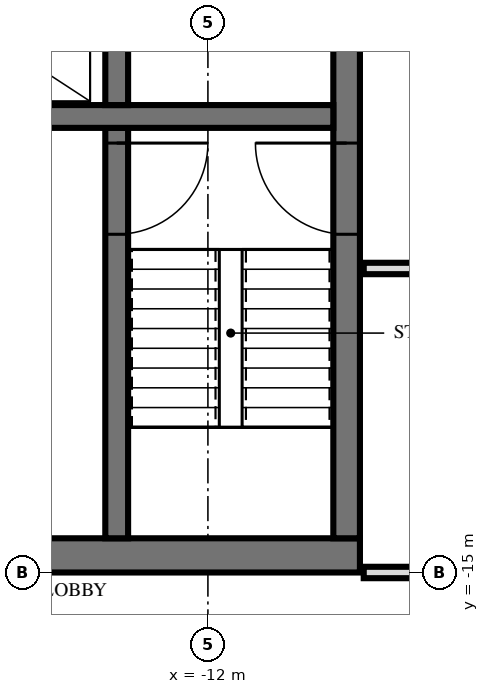
"""IFC4 building model, lengths in metres.
Left out: names, types, materials, properties, quantities, classifications, styles, units other than length and angle.
Written with IfcOpenShell. Run it as: python <this file> out.ifc"""

import sys

from ifc_helpers import new_model, si_unit, direction, frame, frame_2d, origin, place, context, subcontext, project, spatial, rectangle, extrude, element, fill, save


model = new_model("IFC4")
c1 = context("Model", 3, precision=1e-05, world=origin(), true_north=direction((0.0, 1.0)))
c2 = subcontext(c1, "Body", "Model", "MODEL_VIEW")
j1 = project(units=[si_unit("LENGTHUNIT", "METRE"), si_unit("PLANEANGLEUNIT", "RADIAN")], contexts=[c1])
p1 = place(None, origin())
s1 = spatial("IfcSite", under=j1, at=p1, CompositionType="ELEMENT")
p2 = place(p1, origin())
s2 = spatial("IfcBuilding", under=s1, at=p2, CompositionType="ELEMENT")
p3 = place(p2, frame((0.0, 0.0, 85.2)))
s3 = spatial("IfcBuildingStorey", under=s2, at=p3, CompositionType="ELEMENT", Elevation=85.2)
p4 = place(p3, frame((-29.5, -14.775, 0.0), z_axis=(0.0, 0.0, 1.0), x_axis=(1.0, 0.0, 0.0)))
e1 = element("IfcWall", 1, at=p4, inside=s3, PredefinedType="SHEAR", context=c2, shape_type="SweptSolid", body=[
    extrude(rectangle(XDim=19.5, YDim=0.45, at=frame_2d((9.75, 0.0))), origin(), (0.0, 0.0, 1.0), 3.6),
])
p5 = place(p4, frame((11.2, 0.0, 0.0)))
e2 = element("IfcOpeningElement", 2, at=p5, cuts=e1, PredefinedType="OPENING", context=c2, shape_type="SweptSolid", body=[
    extrude(rectangle(XDim=1.2, YDim=2.1, at=frame_2d((0.6, 1.05))), frame((0.0, 0.235, 0.0), z_axis=(0.0, -1.0, 0.0), x_axis=(1.0, 0.0, 0.0)), (0.0, 0.0, 1.0), 0.47),
])
p6 = place(p4, frame((14.25, 0.0, 0.0)))
e3 = element("IfcOpeningElement", 3, at=p6, cuts=e1, PredefinedType="OPENING", context=c2, shape_type="SweptSolid", body=[
    extrude(rectangle(XDim=1.1, YDim=2.1, at=frame_2d((0.55, 1.05))), frame((0.0, 0.235, 0.0), z_axis=(0.0, -1.0, 0.0), x_axis=(1.0, 0.0, 0.0)), (0.0, 0.0, 1.0), 0.47),
])
p7 = place(p4, frame((8.5, 0.0, 0.0)))
e4 = element("IfcOpeningElement", 4, at=p7, cuts=e1, PredefinedType="OPENING", context=c2, shape_type="SweptSolid", body=[
    extrude(rectangle(XDim=0.9, YDim=2.1, at=frame_2d((0.45, 1.05))), frame((0.0, 0.235, 0.0), z_axis=(0.0, -1.0, 0.0), x_axis=(1.0, 0.0, 0.0)), (0.0, 0.0, 1.0), 0.47),
])
p8 = place(p4, frame((6.05, 0.0, 0.0)))
e5 = element("IfcOpeningElement", 5, at=p8, cuts=e1, PredefinedType="OPENING", context=c2, shape_type="SweptSolid", body=[
    extrude(rectangle(XDim=1.0, YDim=2.1, at=frame_2d((0.5, 1.05))), frame((0.0, 0.235, 0.0), z_axis=(0.0, -1.0, 0.0), x_axis=(1.0, 0.0, 0.0)), (0.0, 0.0, 1.0), 0.47),
])
p9 = place(p4, frame((3.587, 0.0, 0.0)))
e6 = element("IfcOpeningElement", 6, at=p9, cuts=e1, PredefinedType="OPENING", context=c2, shape_type="SweptSolid", body=[
    extrude(rectangle(XDim=1.0, YDim=2.1, at=frame_2d((0.5, 1.05))), frame((0.0, 0.235, 0.0), z_axis=(0.0, -1.0, 0.0), x_axis=(1.0, 0.0, 0.0)), (0.0, 0.0, 1.0), 0.47),
])
p10 = place(p4, frame((1.85, 0.0, 0.0)))
e7 = element("IfcOpeningElement", 7, at=p10, cuts=e1, PredefinedType="OPENING", context=c2, shape_type="SweptSolid", body=[
    extrude(rectangle(XDim=1.0, YDim=2.1, at=frame_2d((0.5, 1.05))), frame((0.0, 0.235, 0.0), z_axis=(0.0, -1.0, 0.0), x_axis=(1.0, 0.0, 0.0)), (0.0, 0.0, 1.0), 0.47),
])
p11 = place(p4, frame((0.55, 0.0, 0.0)))
e8 = element("IfcOpeningElement", 8, at=p11, cuts=e1, PredefinedType="OPENING", context=c2, shape_type="SweptSolid", body=[
    extrude(rectangle(XDim=1.0, YDim=2.1, at=frame_2d((0.5, 1.05))), frame((0.0, 0.235, 0.0), z_axis=(0.0, -1.0, 0.0), x_axis=(1.0, 0.0, 0.0)), (0.0, 0.0, 1.0), 0.47),
])
p12 = place(p3, frame((-10.175, -14.55, 0.0), z_axis=(0.0, 0.0, 1.0), x_axis=(0.0, 1.0, 0.0)))
e9 = element("IfcWall", 9, at=p12, inside=s3, PredefinedType="SHEAR", context=c2, shape_type="SweptSolid", body=[
    extrude(rectangle(XDim=14.1, YDim=0.35, at=frame_2d((7.05, 0.0))), origin(), (0.0, 0.0, 1.0), 3.6),
])
p13 = place(p12, frame((8.4, 0.0, 0.0)))
e10 = element("IfcOpeningElement", 10, at=p13, cuts=e9, PredefinedType="OPENING", context=c2, shape_type="SweptSolid", body=[
    extrude(rectangle(XDim=1.4, YDim=2.4, at=frame_2d((0.7, 1.2))), frame((0.0, 0.185, 0.0), z_axis=(0.0, -1.0, 0.0), x_axis=(1.0, 0.0, 0.0)), (0.0, 0.0, 1.0), 0.37),
])
p14 = place(p12, frame((10.0, 0.0, 0.0)))
e11 = element("IfcOpeningElement", 11, at=p14, cuts=e9, PredefinedType="OPENING", context=c2, shape_type="SweptSolid", body=[
    extrude(rectangle(XDim=1.4, YDim=2.4, at=frame_2d((0.7, 1.2))), frame((0.0, 0.185, 0.0), z_axis=(0.0, -1.0, 0.0), x_axis=(1.0, 0.0, 0.0)), (0.0, 0.0, 1.0), 0.37),
])
p15 = place(p12, frame((4.0, 0.0, 0.0)))
e12 = element("IfcOpeningElement", 12, at=p15, cuts=e9, PredefinedType="OPENING", context=c2, shape_type="SweptSolid", body=[
    extrude(rectangle(XDim=1.2, YDim=2.1, at=frame_2d((0.6, 1.05))), frame((0.0, 0.185, 0.0), z_axis=(0.0, -1.0, 0.0), x_axis=(1.0, 0.0, 0.0)), (0.0, 0.0, 1.0), 0.37),
])
p16 = place(p3, frame((-29.05, -9.0, 0.0), z_axis=(0.0, 0.0, 1.0), x_axis=(1.0, 0.0, 0.0)))
e13 = element("IfcWall", 13, at=p16, inside=s3, PredefinedType="SHEAR", context=c2, shape_type="SweptSolid", body=[
    extrude(rectangle(XDim=18.7, YDim=0.3, at=frame_2d((9.35, 0.0))), origin(), (0.0, 0.0, 1.0), 3.6),
])
p17 = place(p16, frame((13.8, 0.0, 0.0)))
e14 = element("IfcOpeningElement", 14, at=p17, cuts=e13, PredefinedType="OPENING", context=c2, shape_type="SweptSolid", body=[
    extrude(rectangle(XDim=1.1, YDim=2.1, at=frame_2d((0.55, 1.05))), frame((0.0, 0.16, 0.0), z_axis=(0.0, -1.0, 0.0), x_axis=(1.0, 0.0, 0.0)), (0.0, 0.0, 1.0), 0.32),
])
p18 = place(p3, frame((-13.2, -8.85, 0.0), z_axis=(0.0, 0.0, 1.0), x_axis=(0.0, 1.0, 0.0)))
e15 = element("IfcWall", 15, at=p18, inside=s3, PredefinedType="SHEAR", context=c2, shape_type="SweptSolid", body=[
    extrude(rectangle(XDim=2.3, YDim=0.3, at=frame_2d((1.15, 0.0))), origin(), (0.0, 0.0, 1.0), 3.6),
])
p19 = place(p3, frame((-13.2, -14.55, 0.0), z_axis=(0.0, 0.0, 1.0), x_axis=(0.0, 1.0, 0.0)))
e16 = element("IfcWall", 16, at=p19, inside=s3, PredefinedType="SHEAR", context=c2, shape_type="SweptSolid", body=[
    extrude(rectangle(XDim=5.4, YDim=0.3, at=frame_2d((2.7, 0.0))), origin(), (0.0, 0.0, 1.0), 3.6),
])
p20 = place(p19, frame((4.0, 0.0, 0.0)))
e17 = element("IfcOpeningElement", 17, at=p20, cuts=e16, PredefinedType="OPENING", context=c2, shape_type="SweptSolid", body=[
    extrude(rectangle(XDim=1.2, YDim=2.1, at=frame_2d((0.6, 1.05))), frame((0.0, 0.16, 0.0), z_axis=(0.0, -1.0, 0.0), x_axis=(1.0, 0.0, 0.0)), (0.0, 0.0, 1.0), 0.32),
])
p21 = place(p3, frame((-9.95, -15.0, 0.0), z_axis=(0.0, 0.0, 1.0), x_axis=(1.0, 0.0, 0.0)))
e18 = element("IfcWall", 18, at=p21, inside=s3, PredefinedType="PARTITIONING", context=c2, shape_type="SweptSolid", body=[
    extrude(rectangle(XDim=19.9, YDim=0.15, at=frame_2d((9.95, 0.0))), origin(), (0.0, 0.0, 1.0), 2.684),
])
p22 = place(p21, frame((9.45, 0.0, 0.0)))
e19 = element("IfcOpeningElement", 19, at=p22, cuts=e18, PredefinedType="OPENING", context=c2, shape_type="SweptSolid", body=[
    extrude(rectangle(XDim=1.0, YDim=2.1, at=frame_2d((0.5, 1.05))), frame((0.0, 0.085, 0.0), z_axis=(0.0, -1.0, 0.0), x_axis=(1.0, 0.0, 0.0)), (0.0, 0.0, 1.0), 0.17),
])
p23 = place(p3, frame((-9.95, -11.0, 0.0), z_axis=(0.0, 0.0, 1.0), x_axis=(1.0, 0.0, 0.0)))
e20 = element("IfcWall", 20, at=p23, inside=s3, PredefinedType="PARTITIONING", context=c2, shape_type="SweptSolid", body=[
    extrude(rectangle(XDim=19.9, YDim=0.15, at=frame_2d((9.95, 0.0))), origin(), (0.0, 0.0, 1.0), 3.32),
])
p24 = place(p23, frame((9.45, 0.0, 0.0)))
e21 = element("IfcOpeningElement", 21, at=p24, cuts=e20, PredefinedType="OPENING", context=c2, shape_type="SweptSolid", body=[
    extrude(rectangle(XDim=1.0, YDim=2.1, at=frame_2d((0.5, 1.05))), frame((0.0, 0.085, 0.0), z_axis=(0.0, -1.0, 0.0), x_axis=(1.0, 0.0, 0.0)), (0.0, 0.0, 1.0), 0.17),
])
p25 = place(p23, frame((3.45, 0.0, 0.0)))
e22 = element("IfcOpeningElement", 22, at=p25, cuts=e20, PredefinedType="OPENING", context=c2, shape_type="SweptSolid", body=[
    extrude(rectangle(XDim=1.0, YDim=2.1, at=frame_2d((0.5, 1.05))), frame((0.0, 0.085, 0.0), z_axis=(0.0, -1.0, 0.0), x_axis=(1.0, 0.0, 0.0)), (0.0, 0.0, 1.0), 0.17),
])
p26 = place(p15, origin())
e23 = element("IfcDoor", 23, at=p26, inside=s3, OperationType="SINGLE_SWING_LEFT", PredefinedType="DOOR", context=c2, shape_type="SweptSolid", body=[
    extrude(rectangle(XDim=1.2, YDim=2.1, at=frame_2d((0.6, 1.05))), frame((0.0, 0.025, 0.0), z_axis=(0.0, -1.0, 0.0), x_axis=(1.0, 0.0, 0.0)), (0.0, 0.0, 1.0), 0.05),
])
fill(e12, e23)
p27 = place(p20, frame((0.6, 0.0, 0.0), z_axis=(0.0, 0.0, 1.0), x_axis=(-1.0, 0.0, 0.0)))
e24 = element("IfcDoor", 24, at=p27, inside=s3, OperationType="SINGLE_SWING_RIGHT", PredefinedType="DOOR", context=c2, shape_type="SweptSolid", body=[
    extrude(rectangle(XDim=1.2, YDim=2.1, at=frame_2d((0.0, 1.05))), frame((0.0, -0.025, 0.0), z_axis=(0.0, 1.0, 0.0), x_axis=(-1.0, 0.0, 0.0)), (0.0, 0.0, 1.0), 0.05),
])
fill(e17, e24)
save(model, sys.argv[1])
